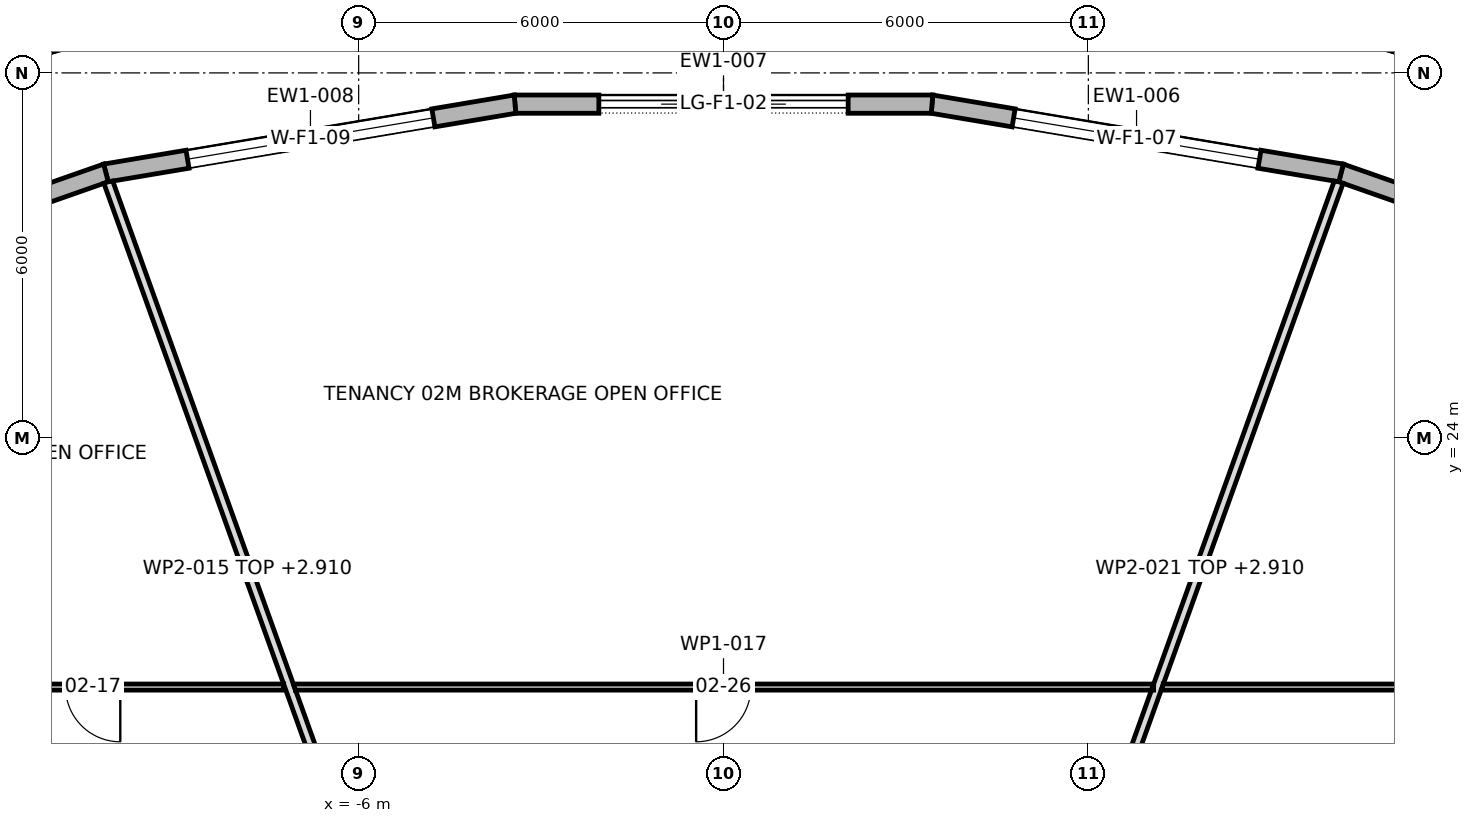
"""IFC4 building model, lengths in metres.
Left out: names, types, materials, properties, quantities, classifications, styles, units other than length and angle.
Written with IfcOpenShell. Run it as: python <this file> out.ifc"""

import sys

from ifc_helpers import new_model, si_unit, direction, frame, frame_2d, origin, origin_2d, place, context, subcontext, project, spatial, polyline, rectangle, outline, extrude, element, fill, save


model = new_model("IFC4")
c1 = context("Model", 3, precision=1e-05, world=origin(), true_north=direction((0.0, 1.0)))
c2 = subcontext(c1, "Body", "Model", "MODEL_VIEW")
j1 = project(units=[si_unit("LENGTHUNIT", "METRE"), si_unit("PLANEANGLEUNIT", "RADIAN")], contexts=[c1])
p1 = place(None, origin())
s1 = spatial("IfcSite", under=j1, at=p1, CompositionType="ELEMENT")
p2 = place(p1, origin())
s2 = spatial("IfcBuilding", under=s1, at=p2, CompositionType="ELEMENT")
p3 = place(p2, frame((0.0, 0.0, 36.1)))
s3 = spatial("IfcBuildingStorey", under=s2, at=p3, CompositionType="ELEMENT", Elevation=36.1)
for number, where, z_axis, x_axis in (
    (1, (10.931, 30.888, 0.0), (0.0, 0.0, 1.0), (-0.968, 0.252, 0.0)),
    (2, (-10.931, 30.888, 0.0), (0.0, 0.0, 1.0), (-0.968, -0.252, 0.0)),
):
    element("IfcColumn", number, at=place(p3, frame(where, z_axis=z_axis, x_axis=x_axis)), inside=s3, PredefinedType="COLUMN", context=c2, shape_type="SweptSolid", body=[
        extrude(rectangle(XDim=1.8, YDim=1.0, at=origin_2d()), origin(), (0.0, 0.0, 1.0), 4.2),
    ])
p4 = place(p3, frame((16.494, 26.135, 0.0), z_axis=(0.0, 0.0, 1.0), x_axis=(-0.943778979427, 0.330577128657, 0.0)))
e3 = element("IfcWall", 3, at=p4, inside=s3, PredefinedType="STANDARD", context=c2, shape_type="SweptSolid", body=[
    extrude(outline(polyline([(-0.013, -0.15), (6.728, -0.15), (6.703, 0.15), (0.013, 0.15), (-0.013, -0.15)])), origin(), (0.0, 0.0, 1.0), 3.9),
])
p5 = place(p4, frame((1.308, 0.0, 0.6)))
e4 = element("IfcOpeningElement", 4, at=p5, cuts=e3, PredefinedType="OPENING", context=c2, shape_type="SweptSolid", body=[
    extrude(rectangle(XDim=4.1, YDim=2.85, at=frame_2d((2.05, 1.425))), frame((0.0, 0.162, 0.0), z_axis=(0.0, -1.0, 0.0), x_axis=(1.0, 0.0, 0.0)), (0.0, 0.0, 1.0), 0.324),
])
p6 = place(p3, frame((10.156, 28.355, 0.0), z_axis=(0.0, 0.0, 1.0), x_axis=(-0.986145179906, 0.165884550659, 0.0)))
e5 = element("IfcWall", 5, at=p6, inside=s3, PredefinedType="STANDARD", context=c2, shape_type="SweptSolid", body=[
    extrude(outline(polyline([(-0.013, -0.15), (6.834, -0.15), (6.809, 0.15), (0.013, 0.15), (-0.013, -0.15)])), origin(), (0.0, 0.0, 1.0), 3.9),
])
p7 = place(p6, frame((1.361, 0.0, 0.6)))
e6 = element("IfcOpeningElement", 6, at=p7, cuts=e5, PredefinedType="OPENING", context=c2, shape_type="SweptSolid", body=[
    extrude(rectangle(XDim=4.1, YDim=2.85, at=frame_2d((2.05, 1.425))), frame((0.0, 0.162, 0.0), z_axis=(0.0, -1.0, 0.0), x_axis=(1.0, 0.0, 0.0)), (0.0, 0.0, 1.0), 0.324),
])
p8 = place(p3, frame((3.429, 29.486, 0.0), z_axis=(0.0, 0.0, 1.0), x_axis=(-1.0, 0.0, 0.0)))
e7 = element("IfcWall", 7, at=p8, inside=s3, PredefinedType="STANDARD", context=c2, shape_type="SweptSolid", body=[
    extrude(outline(polyline([(-0.012, -0.15), (6.871, -0.15), (6.846, 0.15), (0.012, 0.15), (-0.012, -0.15)])), origin(), (0.0, 0.0, 1.0), 3.9),
])
p9 = place(p8, frame((1.379, 0.0, 0.0)))
e8 = element("IfcOpeningElement", 8, at=p9, cuts=e7, PredefinedType="OPENING", context=c2, shape_type="SweptSolid", body=[
    extrude(rectangle(XDim=4.1, YDim=3.45, at=frame_2d((2.05, 1.725))), frame((0.0, 0.162, 0.0), z_axis=(0.0, -1.0, 0.0), x_axis=(1.0, 0.0, 0.0)), (0.0, 0.0, 1.0), 0.324),
])
p10 = place(p3, frame((-3.429, 29.486, 0.0), z_axis=(0.0, 0.0, 1.0), x_axis=(-0.986145179906, -0.165884550659, 0.0)))
e9 = element("IfcWall", 9, at=p10, inside=s3, PredefinedType="STANDARD", context=c2, shape_type="SweptSolid", body=[
    extrude(outline(polyline([(-0.012, -0.15), (6.834, -0.15), (6.809, 0.15), (0.012, 0.15), (-0.012, -0.15)])), origin(), (0.0, 0.0, 1.0), 3.9),
])
p11 = place(p10, frame((1.361, 0.0, 0.6)))
e10 = element("IfcOpeningElement", 10, at=p11, cuts=e9, PredefinedType="OPENING", context=c2, shape_type="SweptSolid", body=[
    extrude(rectangle(XDim=4.1, YDim=2.85, at=frame_2d((2.05, 1.425))), frame((0.0, 0.162, 0.0), z_axis=(0.0, -1.0, 0.0), x_axis=(1.0, 0.0, 0.0)), (0.0, 0.0, 1.0), 0.324),
])
p12 = place(p3, frame((-10.156, 28.355, 0.0), z_axis=(0.0, 0.0, 1.0), x_axis=(-0.943778979427, -0.330577128657, 0.0)))
e11 = element("IfcWall", 11, at=p12, inside=s3, PredefinedType="STANDARD", context=c2, shape_type="SweptSolid", body=[
    extrude(outline(polyline([(-0.013, -0.15), (6.729, -0.15), (6.702, 0.15), (0.013, 0.15), (-0.013, -0.15)])), origin(), (0.0, 0.0, 1.0), 3.9),
])
p13 = place(p12, frame((1.308, 0.0, 0.6)))
e12 = element("IfcOpeningElement", 12, at=p13, cuts=e11, PredefinedType="OPENING", context=c2, shape_type="SweptSolid", body=[
    extrude(rectangle(XDim=4.1, YDim=2.85, at=frame_2d((2.05, 1.425))), frame((0.0, 0.162, 0.0), z_axis=(0.0, -1.0, 0.0), x_axis=(1.0, 0.0, 0.0)), (0.0, 0.0, 1.0), 0.324),
])
p14 = place(p3, frame((-19.95, 19.9, 0.0), z_axis=(0.0, 0.0, 1.0), x_axis=(1.0, 0.0, 0.0)))
e13 = element("IfcWall", 13, at=p14, inside=s3, PredefinedType="PARTITIONING", context=c2, shape_type="SweptSolid", body=[
    extrude(outline(polyline([(12.718, 0.05), (10.901, 0.05), (9.084, 0.05), (7.267, 0.05), (5.45, 0.05), (3.634, 0.05), (1.817, 0.05), (0.0, 0.05), (0.1, -0.05), (1.903, -0.05), (3.705, -0.05), (5.508, -0.05), (7.31, -0.05), (9.113, -0.05), (10.915, -0.05), (12.718, -0.05), (12.718, 0.05)])), origin(), (0.0, 0.0, 1.0), 3.9),
])
p15 = place(p14, frame((9.13, 0.0, 0.0)))
e14 = element("IfcOpeningElement", 14, at=p15, cuts=e13, PredefinedType="OPENING", context=c2, shape_type="SweptSolid", body=[
    extrude(rectangle(XDim=0.9, YDim=2.1, at=frame_2d((0.45, 1.05))), frame((0.0, 0.062, 0.0), z_axis=(0.0, -1.0, 0.0), x_axis=(1.0, 0.0, 0.0)), (0.0, 0.0, 1.0), 0.124),
])
p16 = place(p3, frame((-10.119, 28.209, 0.0), z_axis=(0.0, 0.0, 1.0), x_axis=(0.337949016046, -0.941164418448, 0.0)))
e15 = element("IfcWall", 15, at=p16, inside=s3, PredefinedType="PARTITIONING", context=c2, shape_type="SweptSolid", body=[
    extrude(outline(polyline([(0.0, -0.075), (1.75, -0.075), (3.5, -0.075), (5.249, -0.075), (6.999, -0.075), (8.749, -0.075), (8.749, -0.074), (8.751, -0.075), (10.335, -0.075), (11.919, -0.075), (13.503, -0.075), (13.555, 0.069), (13.555, 0.069), (13.557, 0.074), (13.557, 0.075), (12.008, 0.075), (10.458, 0.075), (8.909, 0.075), (8.908, 0.073), (8.903, 0.075), (7.125, 0.075), (5.347, 0.075), (3.57, 0.075), (1.792, 0.075), (0.014, 0.075), (0.0, 0.0), (0.0, -0.071), (0.0, -0.075)])), origin(), (0.0, 0.0, 1.0), 2.91),
])
p17 = place(p3, frame((-7.074, 19.9, 0.0), z_axis=(0.0, 0.0, 1.0), x_axis=(1.0, 0.0, 0.0)))
e16 = element("IfcWall", 16, at=p17, inside=s3, PredefinedType="PARTITIONING", context=c2, shape_type="SweptSolid", body=[
    extrude(outline(polyline([(0.036, -0.05), (1.795, -0.05), (3.555, -0.05), (5.314, -0.05), (7.074, -0.05), (8.833, -0.05), (10.593, -0.05), (12.353, -0.05), (14.112, -0.05), (14.148, 0.05), (14.148, 0.05), (12.379, 0.05), (10.611, 0.05), (8.843, 0.05), (7.074, 0.05), (5.305, 0.05), (3.537, 0.05), (1.769, 0.05), (0.0, 0.05), (0.0, 0.05), (0.036, -0.05)])), origin(), (0.0, 0.0, 1.0), 3.9),
])
p18 = place(p17, frame((6.624, 0.0, 0.0)))
e17 = element("IfcOpeningElement", 17, at=p18, cuts=e16, PredefinedType="OPENING", context=c2, shape_type="SweptSolid", body=[
    extrude(rectangle(XDim=0.9, YDim=2.1, at=frame_2d((0.45, 1.05))), frame((0.0, 0.062, 0.0), z_axis=(0.0, -1.0, 0.0), x_axis=(1.0, 0.0, 0.0)), (0.0, 0.0, 1.0), 0.124),
])
p19 = place(p3, frame((5.538, 15.45, 0.0), z_axis=(0.0, 0.0, 1.0), x_axis=(0.337949016046, 0.941164418448, 0.0)))
e18 = element("IfcWall", 18, at=p19, inside=s3, PredefinedType="PARTITIONING", context=c2, shape_type="SweptSolid", body=[
    extrude(outline(polyline([(0.053, -0.075), (1.638, -0.075), (3.222, -0.075), (4.806, -0.075), (4.808, -0.074), (4.808, -0.075), (6.558, -0.075), (8.308, -0.075), (10.057, -0.075), (11.807, -0.075), (13.557, -0.075), (13.557, -0.068), (13.556, 0.0), (13.543, 0.075), (11.785, 0.075), (10.028, 0.075), (8.27, 0.075), (6.512, 0.075), (4.754, 0.075), (4.66, 0.041), (4.648, 0.075), (3.099, 0.075), (1.549, 0.075), (0.0, 0.075), (0.0, 0.074), (0.053, -0.075)])), origin(), (0.0, 0.0, 1.0), 2.91),
])
p20 = place(p3, frame((7.198, 19.9, 0.0), z_axis=(0.0, 0.0, 1.0), x_axis=(1.0, 0.0, 0.0)))
e19 = element("IfcWall", 19, at=p20, inside=s3, PredefinedType="PARTITIONING", context=c2, shape_type="SweptSolid", body=[
    extrude(outline(polyline([(0.0, -0.05), (1.807, -0.05), (3.615, -0.05), (5.422, -0.05), (7.23, -0.05), (9.037, -0.05), (10.844, -0.05), (12.652, -0.05), (12.652, -0.05), (12.752, 0.05), (10.935, 0.05), (9.119, 0.05), (7.302, 0.05), (5.485, 0.05), (3.669, 0.05), (1.852, 0.05), (0.035, 0.05), (0.0, -0.049), (0.0, -0.05)])), origin(), (0.0, 0.0, 1.0), 3.9),
])
p21 = place(p20, frame((5.872, 0.0, 0.0)))
e20 = element("IfcOpeningElement", 20, at=p21, cuts=e19, PredefinedType="OPENING", context=c2, shape_type="SweptSolid", body=[
    extrude(rectangle(XDim=0.9, YDim=2.1, at=frame_2d((0.45, 1.05))), frame((0.0, 0.062, 0.0), z_axis=(0.0, -1.0, 0.0), x_axis=(1.0, 0.0, 0.0)), (0.0, 0.0, 1.0), 0.124),
])
p22 = place(p7, origin())
e21 = element("IfcWindow", 21, at=p22, inside=s3, PartitioningType="TRIPLE_PANEL_VERTICAL", PredefinedType="WINDOW", context=c2, shape_type="SweptSolid", body=[
    extrude(rectangle(XDim=4.1, YDim=2.85, at=frame_2d((2.05, 1.425))), frame((0.0, 0.03, 0.0), z_axis=(0.0, -1.0, 0.0), x_axis=(1.0, 0.0, 0.0)), (0.0, 0.0, 1.0), 0.06),
])
fill(e6, e21)
p23 = place(p9, origin())
e22 = element("IfcDoor", 22, at=p23, inside=s3, OperationType="DOUBLE_DOOR_SLIDING", PredefinedType="DOOR", context=c2, shape_type="SweptSolid", body=[
    extrude(rectangle(XDim=4.1, YDim=3.45, at=frame_2d((2.05, 1.725))), frame((0.0, 0.025, 0.0), z_axis=(0.0, -1.0, 0.0), x_axis=(1.0, 0.0, 0.0)), (0.0, 0.0, 1.0), 0.05),
])
fill(e8, e22)
p24 = place(p11, origin())
e23 = element("IfcWindow", 23, at=p24, inside=s3, PartitioningType="TRIPLE_PANEL_VERTICAL", PredefinedType="WINDOW", context=c2, shape_type="SweptSolid", body=[
    extrude(rectangle(XDim=4.1, YDim=2.85, at=frame_2d((2.05, 1.425))), frame((0.0, 0.03, 0.0), z_axis=(0.0, -1.0, 0.0), x_axis=(1.0, 0.0, 0.0)), (0.0, 0.0, 1.0), 0.06),
])
fill(e10, e23)
p25 = place(p15, frame((0.9, 0.0, 0.0), z_axis=(0.0, 0.0, 1.0), x_axis=(-1.0, 0.0, 0.0)))
e24 = element("IfcDoor", 24, at=p25, inside=s3, OperationType="SINGLE_SWING_RIGHT", PredefinedType="DOOR", context=c2, shape_type="SweptSolid", body=[
    extrude(rectangle(XDim=0.9, YDim=2.1, at=frame_2d((0.45, 1.05))), frame((0.0, 0.025, 0.0), z_axis=(0.0, -1.0, 0.0), x_axis=(1.0, 0.0, 0.0)), (0.0, 0.0, 1.0), 0.05),
])
fill(e14, e24)
p26 = place(p18, frame((0.9, 0.0, 0.0), z_axis=(0.0, 0.0, 1.0), x_axis=(-1.0, 0.0, 0.0)))
e25 = element("IfcDoor", 25, at=p26, inside=s3, OperationType="SINGLE_SWING_LEFT", PredefinedType="DOOR", context=c2, shape_type="SweptSolid", body=[
    extrude(rectangle(XDim=0.9, YDim=2.1, at=frame_2d((0.45, 1.05))), frame((0.0, 0.025, 0.0), z_axis=(0.0, -1.0, 0.0), x_axis=(1.0, 0.0, 0.0)), (0.0, 0.0, 1.0), 0.05),
])
fill(e17, e25)
save(model, sys.argv[1])
